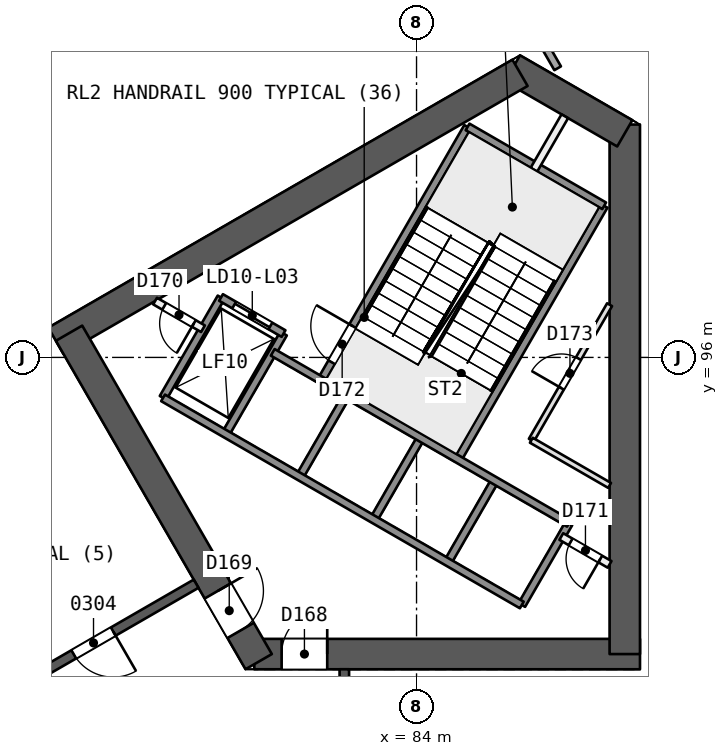
"""IFC4 building model, lengths in metres.
Left out: names, types, materials, properties, quantities, classifications, styles, units other than length and angle.
Written with IfcOpenShell. Run it as: python <this file> out.ifc"""

import sys

from ifc_helpers import new_model, si_unit, direction, frame, frame_2d, origin, place, context, subcontext, project, spatial, rectangle, extrude, element, fill, save


model = new_model("IFC4")
c1 = context("Model", 3, precision=1e-05, world=origin(), true_north=direction((0.0, 1.0)))
c2 = subcontext(c1, "Body", "Model", "MODEL_VIEW")
j1 = project(units=[si_unit("LENGTHUNIT", "METRE"), si_unit("PLANEANGLEUNIT", "RADIAN")], contexts=[c1])
p1 = place(None, origin())
s1 = spatial("IfcSite", under=j1, at=p1, CompositionType="ELEMENT")
p2 = place(p1, origin())
s2 = spatial("IfcBuilding", under=s1, at=p2, CompositionType="ELEMENT")
p3 = place(p2, frame((0.0, 0.0, 20.4)))
s3 = spatial("IfcBuildingStorey", under=s2, at=p3, CompositionType="ELEMENT", Elevation=20.4)
p4 = place(p3, frame((79.731, 88.194, 0.0), z_axis=(0.0, 0.0, 1.0), x_axis=(1.0, 0.0, 0.0)))
e1 = element("IfcWall", 1, at=p4, inside=s3, PredefinedType="SHEAR", context=c2, shape_type="SweptSolid", body=[
    extrude(rectangle(XDim=10.149, YDim=0.8, at=frame_2d((5.074, 0.0))), origin(), (0.0, 0.0, 1.0), 5.0),
])
p5 = place(p4, frame((0.719, 0.0, 0.0)))
e2 = element("IfcOpeningElement", 2, at=p5, cuts=e1, PredefinedType="OPENING", context=c2, shape_type="SweptSolid", body=[
    extrude(rectangle(XDim=1.2, YDim=2.1, at=frame_2d((0.6, 1.05))), frame((0.0, 0.411, 0.0), z_axis=(0.0, -1.0, 0.0), x_axis=(1.0, 0.0, 0.0)), (0.0, 0.0, 1.0), 0.821),
])
p6 = place(p3, frame((89.48, 88.194, 0.0), z_axis=(0.0, 0.0, 1.0), x_axis=(0.0, 1.0, 0.0)))
e3 = element("IfcWall", 3, at=p6, inside=s3, PredefinedType="SHEAR", context=c2, shape_type="SweptSolid", body=[
    extrude(rectangle(XDim=13.933, YDim=0.8, at=frame_2d((6.967, 0.0))), origin(), (0.0, 0.0, 1.0), 5.0),
])
p7 = place(p3, frame((89.48, 101.897, 0.0), z_axis=(0.0, 0.0, 1.0), x_axis=(-0.866034355626, 0.499984494636, 0.0)))
e4 = element("IfcWall", 4, at=p7, inside=s3, PredefinedType="SHEAR", context=c2, shape_type="SweptSolid", body=[
    extrude(rectangle(XDim=3.414, YDim=0.8, at=frame_2d((1.707, 0.0))), origin(), (0.0, 0.0, 1.0), 5.0),
])
p8 = place(p3, frame((86.723, 103.488, 0.0), z_axis=(0.0, 0.0, 1.0), x_axis=(-0.866032504327, -0.499987701298, 0.0)))
e5 = element("IfcWall", 5, at=p8, inside=s3, PredefinedType="SHEAR", context=c2, shape_type="SweptSolid", body=[
    extrude(rectangle(XDim=14.102, YDim=0.8, at=frame_2d((7.051, 0.0))), origin(), (0.0, 0.0, 1.0), 5.0),
])
p9 = place(p3, frame((74.856, 96.637, 0.0), z_axis=(0.0, 0.0, 1.0), x_axis=(0.499993500917, -0.866029155999, 0.0)))
e6 = element("IfcWall", 6, at=p9, inside=s3, PredefinedType="SHEAR", context=c2, shape_type="SweptSolid", body=[
    extrude(rectangle(XDim=9.98, YDim=0.8, at=frame_2d((4.99, 0.0))), origin(), (0.0, 0.0, 1.0), 5.0),
])
p10 = place(p9, frame((7.83, 0.0, 0.0)))
e7 = element("IfcOpeningElement", 7, at=p10, cuts=e6, PredefinedType="OPENING", context=c2, shape_type="SweptSolid", body=[
    extrude(rectangle(XDim=1.2, YDim=2.1, at=frame_2d((0.6, 1.05))), frame((0.0, 0.411, 0.0), z_axis=(0.0, -1.0, 0.0), x_axis=(1.0, 0.0, 0.0)), (0.0, 0.0, 1.0), 0.821),
])
p11 = place(p3, frame((82.1, 72.206, 0.0), z_axis=(0.0, 0.0, 1.0), x_axis=(0.0, 1.0, 0.0)))
e8 = element("IfcWall", 8, at=p11, inside=s3, PredefinedType="SHEAR", context=c2, shape_type="SweptSolid", body=[
    extrude(rectangle(XDim=15.588, YDim=0.25, at=frame_2d((7.794, 0.0))), origin(), (0.0, 0.0, 1.0), 4.5),
])
p12 = place(p11, frame((2.05, 0.0, 0.0)))
e9 = element("IfcOpeningElement", 9, at=p12, cuts=e8, PredefinedType="OPENING", context=c2, shape_type="SweptSolid", body=[
    extrude(rectangle(XDim=1.2, YDim=2.4, at=frame_2d((0.6, 1.2))), frame((0.0, 0.135, 0.0), z_axis=(0.0, -1.0, 0.0), x_axis=(1.0, 0.0, 0.0)), (0.0, 0.0, 1.0), 0.271),
])
p13 = place(p11, frame((7.272, 0.0, 0.0)))
e10 = element("IfcOpeningElement", 10, at=p13, cuts=e8, PredefinedType="OPENING", context=c2, shape_type="SweptSolid", body=[
    extrude(rectangle(XDim=1.2, YDim=2.4, at=frame_2d((0.6, 1.2))), frame((0.0, 0.135, 0.0), z_axis=(0.0, -1.0, 0.0), x_axis=(1.0, 0.0, 0.0)), (0.0, 0.0, 1.0), 0.271),
])
p14 = place(p11, frame((12.417, 0.0, 0.0)))
e11 = element("IfcOpeningElement", 11, at=p14, cuts=e8, PredefinedType="OPENING", context=c2, shape_type="SweptSolid", body=[
    extrude(rectangle(XDim=1.2, YDim=2.4, at=frame_2d((0.6, 1.2))), frame((0.0, 0.135, 0.0), z_axis=(0.0, -1.0, 0.0), x_axis=(1.0, 0.0, 0.0)), (0.0, 0.0, 1.0), 0.271),
])
p15 = place(p3, frame((78.2, 90.046, 0.0), z_axis=(0.0, 0.0, 1.0), x_axis=(-0.866026492143, -0.499998114903, 0.0)))
e12 = element("IfcWall", 12, at=p15, inside=s3, PredefinedType="SHEAR", context=c2, shape_type="SweptSolid", body=[
    extrude(rectangle(XDim=15.588, YDim=0.25, at=frame_2d((7.794, 0.0))), origin(), (0.0, 0.0, 1.0), 4.5),
])
p16 = place(p15, frame((2.518, 0.0, 0.0)))
e13 = element("IfcOpeningElement", 13, at=p16, cuts=e12, PredefinedType="OPENING", context=c2, shape_type="SweptSolid", body=[
    extrude(rectangle(XDim=1.2, YDim=2.4, at=frame_2d((0.6, 1.2))), frame((0.0, 0.135, 0.0), z_axis=(0.0, -1.0, 0.0), x_axis=(1.0, 0.0, 0.0)), (0.0, 0.0, 1.0), 0.271),
])
p17 = place(p15, frame((6.487, 0.0, 0.0)))
e14 = element("IfcOpeningElement", 14, at=p17, cuts=e12, PredefinedType="OPENING", context=c2, shape_type="SweptSolid", body=[
    extrude(rectangle(XDim=0.9, YDim=2.1, at=frame_2d((0.45, 1.05))), frame((0.0, 0.135, 0.0), z_axis=(0.0, -1.0, 0.0), x_axis=(1.0, 0.0, 0.0)), (0.0, 0.0, 1.0), 0.271),
])
p18 = place(p15, frame((7.89, 0.0, 0.0)))
e15 = element("IfcOpeningElement", 15, at=p18, cuts=e12, PredefinedType="OPENING", context=c2, shape_type="SweptSolid", body=[
    extrude(rectangle(XDim=0.9, YDim=2.1, at=frame_2d((0.45, 1.05))), frame((0.0, 0.135, 0.0), z_axis=(0.0, -1.0, 0.0), x_axis=(1.0, 0.0, 0.0)), (0.0, 0.0, 1.0), 0.271),
])
p19 = place(p15, frame((9.527, 0.0, 0.0)))
e16 = element("IfcOpeningElement", 16, at=p19, cuts=e12, PredefinedType="OPENING", context=c2, shape_type="SweptSolid", body=[
    extrude(rectangle(XDim=0.9, YDim=2.1, at=frame_2d((0.45, 1.05))), frame((0.0, 0.135, 0.0), z_axis=(0.0, -1.0, 0.0), x_axis=(1.0, 0.0, 0.0)), (0.0, 0.0, 1.0), 0.271),
])
p20 = place(p15, frame((12.65, 0.0, 0.0)))
e17 = element("IfcOpeningElement", 17, at=p20, cuts=e12, PredefinedType="OPENING", context=c2, shape_type="SweptSolid", body=[
    extrude(rectangle(XDim=1.2, YDim=2.4, at=frame_2d((0.6, 1.2))), frame((0.0, 0.135, 0.0), z_axis=(0.0, -1.0, 0.0), x_axis=(1.0, 0.0, 0.0)), (0.0, 0.0, 1.0), 0.271),
])
p21 = place(p3, frame((87.714, 103.608, 0.0), z_axis=(0.0, 0.0, 1.0), x_axis=(-0.500002221596, 0.866024121142, 0.0)))
e18 = element("IfcWall", 18, at=p21, inside=s3, PredefinedType="PARTITIONING", context=c2, shape_type="SweptSolid", body=[
    extrude(rectangle(XDim=7.755, YDim=0.2, at=frame_2d((3.878, 0.0))), origin(), (0.0, 0.0, 1.0), 4.5),
])
p22 = place(p21, frame((3.278, 0.0, 0.0)))
e19 = element("IfcOpeningElement", 19, at=p22, cuts=e18, PredefinedType="OPENING", context=c2, shape_type="SweptSolid", body=[
    extrude(rectangle(XDim=1.2, YDim=2.4, at=frame_2d((0.6, 1.2))), frame((0.0, 0.11, 0.0), z_axis=(0.0, -1.0, 0.0), x_axis=(1.0, 0.0, 0.0)), (0.0, 0.0, 1.0), 0.221),
])
p23 = place(p3, frame((26.66, 85.0, 0.0), z_axis=(0.0, 0.0, 1.0), x_axis=(0.866025599265, 0.499999661418, 0.0)))
e20 = element("IfcWall", 20, at=p23, inside=s3, PredefinedType="SOLIDWALL", context=c2, shape_type="SweptSolid", body=[
    extrude(rectangle(XDim=78.727, YDim=0.4, at=frame_2d((39.364, 0.0))), origin(), (0.0, 0.0, 1.0), 4.5),
])
p24 = place(p23, frame((42.84, 0.0, 0.9)))
e21 = element("IfcOpeningElement", 21, at=p24, cuts=e20, PredefinedType="OPENING", context=c2, shape_type="SweptSolid", body=[
    extrude(rectangle(XDim=2.4, YDim=2.4, at=frame_2d((1.2, 1.2))), frame((0.0, 0.21, 0.0), z_axis=(0.0, -1.0, 0.0), x_axis=(1.0, 0.0, 0.0)), (0.0, 0.0, 1.0), 0.421),
])
p25 = place(p23, frame((37.385, 0.0, 0.9)))
e22 = element("IfcOpeningElement", 22, at=p25, cuts=e20, PredefinedType="OPENING", context=c2, shape_type="SweptSolid", body=[
    extrude(rectangle(XDim=2.4, YDim=2.4, at=frame_2d((1.2, 1.2))), frame((0.0, 0.21, 0.0), z_axis=(0.0, -1.0, 0.0), x_axis=(1.0, 0.0, 0.0)), (0.0, 0.0, 1.0), 0.421),
])
p26 = place(p23, frame((32.708, 0.0, 0.9)))
e23 = element("IfcOpeningElement", 23, at=p26, cuts=e20, PredefinedType="OPENING", context=c2, shape_type="SweptSolid", body=[
    extrude(rectangle(XDim=2.4, YDim=2.4, at=frame_2d((1.2, 1.2))), frame((0.0, 0.21, 0.0), z_axis=(0.0, -1.0, 0.0), x_axis=(1.0, 0.0, 0.0)), (0.0, 0.0, 1.0), 0.421),
])
p27 = place(p3, frame((86.77, 89.486, 0.0), z_axis=(0.0, 0.0, 1.0), x_axis=(0.499961042966, 0.86604789447, 0.0)))
e24 = element("IfcWall", 24, at=p27, inside=s3, PredefinedType="SOLIDWALL", context=c2, shape_type="SweptSolid", body=[
    extrude(rectangle(XDim=2.48, YDim=0.2, at=frame_2d((1.24, 0.0))), origin(), (0.0, 0.0, 1.0), 4.5),
])
p28 = place(p3, frame((87.021, 93.821, 0.0), z_axis=(0.0, 0.0, 1.0), x_axis=(0.500028662945, 0.866008854593, 0.0)))
e25 = element("IfcWall", 25, at=p28, inside=s3, PredefinedType="PARTITIONING", context=c2, shape_type="SweptSolid", body=[
    extrude(rectangle(XDim=4.118, YDim=0.15, at=frame_2d((2.059, 0.0))), origin(), (0.0, 0.0, 1.0), 4.5),
])
p29 = place(p28, frame((1.582, 0.0, 0.0)))
e26 = element("IfcOpeningElement", 26, at=p29, cuts=e25, PredefinedType="OPENING", context=c2, shape_type="SweptSolid", body=[
    extrude(rectangle(XDim=0.9, YDim=2.1, at=frame_2d((0.45, 1.05))), frame((0.0, 0.085, 0.0), z_axis=(0.0, -1.0, 0.0), x_axis=(1.0, 0.0, 0.0)), (0.0, 0.0, 1.0), 0.171),
])
p30 = place(p3, frame((84.821, 90.611, 0.0), z_axis=(0.0, 0.0, 1.0), x_axis=(0.499961042966, 0.86604789447, 0.0)))
e27 = element("IfcWall", 27, at=p30, inside=s3, PredefinedType="SOLIDWALL", context=c2, shape_type="SweptSolid", body=[
    extrude(rectangle(XDim=2.48, YDim=0.2, at=frame_2d((1.24, 0.0))), origin(), (0.0, 0.0, 1.0), 4.5),
])
p31 = place(p3, frame((85.087, 93.321, 0.0), z_axis=(0.0, 0.0, 1.0), x_axis=(0.500019787375, 0.866013979237, 0.0)))
e28 = element("IfcWall", 28, at=p31, inside=s3, PredefinedType="SOLIDWALL", context=c2, shape_type="SweptSolid", body=[
    extrude(rectangle(XDim=7.7, YDim=0.2, at=frame_2d((3.85, 0.0))), origin(), (0.0, 0.0, 1.0), 4.5),
])
p32 = place(p3, frame((82.873, 91.736, 0.0), z_axis=(0.0, 0.0, 1.0), x_axis=(0.499961042966, 0.86604789447, 0.0)))
e29 = element("IfcWall", 29, at=p32, inside=s3, PredefinedType="SOLIDWALL", context=c2, shape_type="SweptSolid", body=[
    extrude(rectangle(XDim=2.48, YDim=0.2, at=frame_2d((1.24, 0.0))), origin(), (0.0, 0.0, 1.0), 4.5),
])
p33 = place(p3, frame((87.09, 100.94, 0.0), z_axis=(0.0, 0.0, 1.0), x_axis=(0.499956811548, 0.866050337213, 0.0)))
e30 = element("IfcWall", 30, at=p33, inside=s3, PredefinedType="PARTITIONING", context=c2, shape_type="SweptSolid", body=[
    extrude(rectangle(XDim=1.623, YDim=0.2, at=frame_2d((0.812, 0.0))), origin(), (0.0, 0.0, 1.0), 4.5),
])
p34 = place(p3, frame((80.924, 92.861, 0.0), z_axis=(0.0, 0.0, 1.0), x_axis=(0.499961042966, 0.86604789447, 0.0)))
e31 = element("IfcWall", 31, at=p34, inside=s3, PredefinedType="SOLIDWALL", context=c2, shape_type="SweptSolid", body=[
    extrude(rectangle(XDim=2.48, YDim=0.2, at=frame_2d((1.24, 0.0))), origin(), (0.0, 0.0, 1.0), 4.5),
])
p35 = place(p3, frame((81.493, 95.396, 0.0), z_axis=(0.0, 0.0, 1.0), x_axis=(0.500006057782, 0.866021906294, 0.0)))
e32 = element("IfcWall", 32, at=p35, inside=s3, PredefinedType="SOLIDWALL", context=c2, shape_type="SweptSolid", body=[
    extrude(rectangle(XDim=7.7, YDim=0.2, at=frame_2d((3.85, 0.0))), origin(), (0.0, 0.0, 1.0), 4.5),
])
p36 = place(p35, frame((0.55, 0.0, 0.0)))
e33 = element("IfcOpeningElement", 33, at=p36, cuts=e32, PredefinedType="OPENING", context=c2, shape_type="SweptSolid", body=[
    extrude(rectangle(XDim=1.1, YDim=2.1, at=frame_2d((0.55, 1.05))), frame((0.0, 0.11, 0.0), z_axis=(0.0, -1.0, 0.0), x_axis=(1.0, 0.0, 0.0)), (0.0, 0.0, 1.0), 0.221),
])
for number, where, z_axis, x_axis in (
    (34, (78.976, 93.986, 0.0), (0.0, 0.0, 1.0), (0.5, 0.866, 0.0)),
    (35, (77.33, 94.936, 0.0), (0.0, 0.0, 1.0), (0.5, 0.866, 0.0)),
):
    element("IfcWall", number, at=place(p3, frame(where, z_axis=z_axis, x_axis=x_axis)), inside=s3, PredefinedType="SOLIDWALL", context=c2, shape_type="SweptSolid", body=[
        extrude(rectangle(XDim=3.05, YDim=0.2, at=frame_2d((1.525, 0.0))), origin(), (0.0, 0.0, 1.0), 4.5),
    ])
p37 = place(p3, frame((86.77, 89.486, 0.0), z_axis=(0.0, 0.0, 1.0), x_axis=(-0.86601811187, 0.500012629753, 0.0)))
e36 = element("IfcWall", 36, at=p37, inside=s3, PredefinedType="SOLIDWALL", context=c2, shape_type="SweptSolid", body=[
    extrude(rectangle(XDim=10.9, YDim=0.2, at=frame_2d((5.45, 0.0))), origin(), (0.0, 0.0, 1.0), 4.5),
])
p38 = place(p3, frame((89.08, 90.554, 0.0), z_axis=(0.0, 0.0, 1.0), x_axis=(-0.866022048785, 0.500005810984, 0.0)))
e37 = element("IfcWall", 37, at=p38, inside=s3, PredefinedType="PARTITIONING", context=c2, shape_type="SweptSolid", body=[
    extrude(rectangle(XDim=1.467, YDim=0.2, at=frame_2d((0.733, 0.0))), origin(), (0.0, 0.0, 1.0), 4.5),
])
p39 = place(p38, frame((0.283, 0.0, 0.0)))
e38 = element("IfcOpeningElement", 38, at=p39, cuts=e37, PredefinedType="OPENING", context=c2, shape_type="SweptSolid", body=[
    extrude(rectangle(XDim=0.9, YDim=2.1, at=frame_2d((0.45, 1.05))), frame((0.0, 0.11, 0.0), z_axis=(0.0, -1.0, 0.0), x_axis=(1.0, 0.0, 0.0)), (0.0, 0.0, 1.0), 0.221),
])
p40 = place(p3, frame((78.38, 96.755, 0.0), z_axis=(0.0, 0.0, 1.0), x_axis=(-0.866003949776, 0.500037157592, 0.0)))
e39 = element("IfcWall", 39, at=p40, inside=s3, PredefinedType="PARTITIONING", context=c2, shape_type="SweptSolid", body=[
    extrude(rectangle(XDim=1.455, YDim=0.2, at=frame_2d((0.728, 0.0))), origin(), (0.0, 0.0, 1.0), 4.5),
])
p41 = place(p40, frame((0.278, 0.0, 0.0)))
e40 = element("IfcOpeningElement", 40, at=p41, cuts=e39, PredefinedType="OPENING", context=c2, shape_type="SweptSolid", body=[
    extrude(rectangle(XDim=0.9, YDim=2.1, at=frame_2d((0.45, 1.05))), frame((0.0, 0.11, 0.0), z_axis=(0.0, -1.0, 0.0), x_axis=(1.0, 0.0, 0.0)), (0.0, 0.0, 1.0), 0.221),
])
p42 = place(p3, frame((88.01, 91.634, 0.0), z_axis=(0.0, 0.0, 1.0), x_axis=(-0.866024315419, 0.5000018851, 0.0)))
e41 = element("IfcWall", 41, at=p42, inside=s3, PredefinedType="SOLIDWALL", context=c2, shape_type="SweptSolid", body=[
    extrude(rectangle(XDim=9.0, YDim=0.2, at=frame_2d((4.5, 0.0))), origin(), (0.0, 0.0, 1.0), 4.5),
])
p43 = place(p3, frame((80.5, 96.627, 0.0), z_axis=(0.0, 0.0, 1.0), x_axis=(-0.86601224135, 0.500022797313, 0.0)))
e42 = element("IfcWall", 42, at=p43, inside=s3, PredefinedType="SOLIDWALL", context=c2, shape_type="SweptSolid", body=[
    extrude(rectangle(XDim=1.9, YDim=0.2, at=frame_2d((0.95, 0.0))), origin(), (0.0, 0.0, 1.0), 4.5),
])
p44 = place(p43, frame((0.4, 0.0, 0.0)))
e43 = element("IfcOpeningElement", 43, at=p44, cuts=e42, PredefinedType="OPENING", context=c2, shape_type="SweptSolid", body=[
    extrude(rectangle(XDim=1.1, YDim=2.1, at=frame_2d((0.55, 1.05))), frame((0.0, 0.11, 0.0), z_axis=(0.0, -1.0, 0.0), x_axis=(1.0, 0.0, 0.0)), (0.0, 0.0, 1.0), 0.221),
])
p45 = place(p3, frame((89.08, 92.632, 0.0), z_axis=(0.0, 0.0, 1.0), x_axis=(-0.866041951395, 0.499971337603, 0.0)))
e44 = element("IfcWall", 44, at=p45, inside=s3, PredefinedType="PARTITIONING", context=c2, shape_type="SweptSolid", body=[
    extrude(rectangle(XDim=2.378, YDim=0.15, at=frame_2d((1.189, 0.0))), origin(), (0.0, 0.0, 1.0), 4.5),
])
p46 = place(p3, frame((88.937, 99.99, 0.0), z_axis=(0.0, 0.0, 1.0), x_axis=(-0.866004344652, 0.500036473714, 0.0)))
e45 = element("IfcWall", 45, at=p46, inside=s3, PredefinedType="SOLIDWALL", context=c2, shape_type="SweptSolid", body=[
    extrude(rectangle(XDim=4.15, YDim=0.2, at=frame_2d((2.075, 0.0))), origin(), (0.0, 0.0, 1.0), 4.5),
])
p47 = place(p16, origin())
e46 = element("IfcDoor", 46, at=p47, inside=s3, OperationType="SINGLE_SWING_LEFT", PredefinedType="NOTDEFINED", context=c2, shape_type="SweptSolid", body=[
    extrude(rectangle(XDim=1.2, YDim=2.4, at=frame_2d((0.6, 1.2))), frame((0.0, 0.025, 0.0), z_axis=(0.0, -1.0, 0.0), x_axis=(1.0, 0.0, 0.0)), (0.0, 0.0, 1.0), 0.05),
])
fill(e13, e46)
p48 = place(p5, origin())
e47 = element("IfcDoor", 47, at=p48, inside=s3, OperationType="SINGLE_SWING_RIGHT", PredefinedType="NOTDEFINED", context=c2, shape_type="SweptSolid", body=[
    extrude(rectangle(XDim=1.2, YDim=2.1, at=frame_2d((0.6, 1.05))), frame((0.0, 0.025, 0.0), z_axis=(0.0, -1.0, 0.0), x_axis=(1.0, 0.0, 0.0)), (0.0, 0.0, 1.0), 0.05),
])
fill(e2, e47)
p49 = place(p10, origin())
e48 = element("IfcDoor", 48, at=p49, inside=s3, OperationType="SINGLE_SWING_LEFT", PredefinedType="NOTDEFINED", context=c2, shape_type="SweptSolid", body=[
    extrude(rectangle(XDim=1.2, YDim=2.1, at=frame_2d((0.6, 1.05))), frame((0.0, 0.025, 0.0), z_axis=(0.0, -1.0, 0.0), x_axis=(1.0, 0.0, 0.0)), (0.0, 0.0, 1.0), 0.05),
])
fill(e7, e48)
p50 = place(p44, origin())
e49 = element("IfcDoor", 49, at=p50, inside=s3, OperationType="SLIDING_TO_RIGHT", PredefinedType="NOTDEFINED", context=c2, shape_type="SweptSolid", body=[
    extrude(rectangle(XDim=1.1, YDim=2.1, at=frame_2d((0.55, 1.05))), frame((0.0, 0.025, 0.0), z_axis=(0.0, -1.0, 0.0), x_axis=(1.0, 0.0, 0.0)), (0.0, 0.0, 1.0), 0.05),
])
fill(e43, e49)
p51 = place(p41, origin())
e50 = element("IfcDoor", 50, at=p51, inside=s3, OperationType="SINGLE_SWING_LEFT", PredefinedType="NOTDEFINED", context=c2, shape_type="SweptSolid", body=[
    extrude(rectangle(XDim=0.9, YDim=2.1, at=frame_2d((0.45, 1.05))), frame((0.0, 0.025, 0.0), z_axis=(0.0, -1.0, 0.0), x_axis=(1.0, 0.0, 0.0)), (0.0, 0.0, 1.0), 0.05),
])
fill(e40, e50)
p52 = place(p39, origin())
e51 = element("IfcDoor", 51, at=p52, inside=s3, OperationType="SINGLE_SWING_LEFT", PredefinedType="NOTDEFINED", context=c2, shape_type="SweptSolid", body=[
    extrude(rectangle(XDim=0.9, YDim=2.1, at=frame_2d((0.45, 1.05))), frame((0.0, 0.025, 0.0), z_axis=(0.0, -1.0, 0.0), x_axis=(1.0, 0.0, 0.0)), (0.0, 0.0, 1.0), 0.05),
])
fill(e38, e51)
p53 = place(p36, origin())
e52 = element("IfcDoor", 52, at=p53, inside=s3, OperationType="SINGLE_SWING_RIGHT", PredefinedType="NOTDEFINED", context=c2, shape_type="SweptSolid", body=[
    extrude(rectangle(XDim=1.1, YDim=2.1, at=frame_2d((0.55, 1.05))), frame((0.0, 0.025, 0.0), z_axis=(0.0, -1.0, 0.0), x_axis=(1.0, 0.0, 0.0)), (0.0, 0.0, 1.0), 0.05),
])
fill(e33, e52)
p54 = place(p29, origin())
e53 = element("IfcDoor", 53, at=p54, inside=s3, OperationType="SINGLE_SWING_LEFT", PredefinedType="NOTDEFINED", context=c2, shape_type="SweptSolid", body=[
    extrude(rectangle(XDim=0.9, YDim=2.1, at=frame_2d((0.45, 1.05))), frame((0.0, 0.025, 0.0), z_axis=(0.0, -1.0, 0.0), x_axis=(1.0, 0.0, 0.0)), (0.0, 0.0, 1.0), 0.05),
])
fill(e26, e53)
save(model, sys.argv[1])
